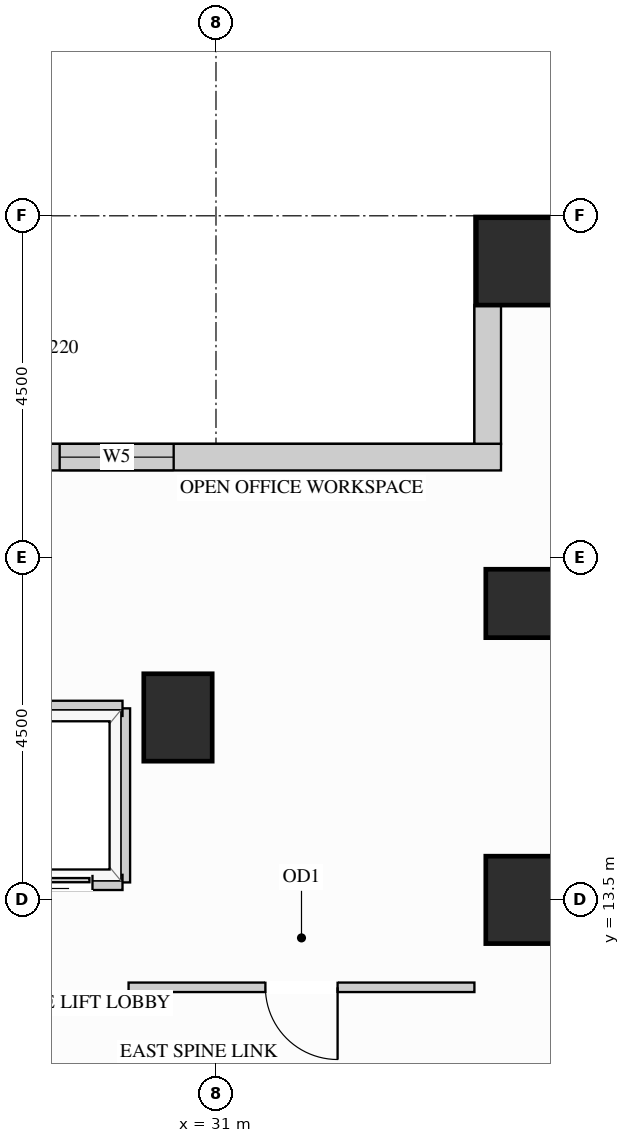
"""IFC4 building model, lengths in metres.
Left out: names, types, materials, properties, quantities, classifications, styles, units other than length and angle.
Written with IfcOpenShell. Run it as: python <this file> out.ifc"""

import sys

from ifc_helpers import new_model, si_unit, direction, frame, frame_2d, origin, origin_2d, place, context, subcontext, project, spatial, rectangle, extrude, source, transform, mapped, element, fill, save


model = new_model("IFC4")
c1 = context("Model", 3, precision=1e-05, world=origin(), true_north=direction((0.0, 1.0)))
c2 = subcontext(c1, "Body", "Model", "MODEL_VIEW")
j1 = project(units=[si_unit("LENGTHUNIT", "METRE"), si_unit("PLANEANGLEUNIT", "RADIAN")], contexts=[c1])
p1 = place(None, origin())
s1 = spatial("IfcSite", under=j1, at=p1, CompositionType="ELEMENT")
p2 = place(p1, origin())
s2 = spatial("IfcBuilding", under=s1, at=p2, CompositionType="ELEMENT")
p3 = place(p2, frame((0.0, 0.0, 106.2)))
s3 = spatial("IfcBuildingStorey", under=s2, at=p3, CompositionType="ELEMENT", Elevation=106.2)
m1 = source(origin(), c2, "Body", "SweptSolid", [
    extrude(rectangle(XDim=0.9, YDim=0.9, at=origin_2d()), origin(), (0.0, 0.0, 1.0), 3.38),
])
p4 = place(p3, frame((35.0, 17.4, 0.0), z_axis=(0.0, 0.0, 1.0), x_axis=(1.0, 0.0, 0.0)))
e1 = element("IfcColumn", 1, at=p4, inside=s3, PredefinedType="COLUMN", context=c2, shape_type="MappedRepresentation", body=[
    mapped(m1, transform((0.0, 0.0, 0.0), x_axis=(1.0, 0.0, 0.0), y_axis=(0.0, 1.0, 0.0), z_axis=(0.0, 0.0, 1.0))),
])
m2 = source(origin(), c2, "Body", "SweptSolid", [
    extrude(rectangle(XDim=0.9, YDim=1.15, at=origin_2d()), origin(), (0.0, 0.0, 1.0), 3.38),
])
for number, where, z_axis, x_axis in (
    (2, (35.0, 13.5, 0.0), (0.0, 0.0, 1.0), (1.0, 0.0, 0.0)),
    (3, (30.5, 15.9, 0.0), (0.0, 0.0, 1.0), (1.0, 0.0, 0.0)),
):
    element("IfcColumn", number, at=place(p3, frame(where, z_axis=z_axis, x_axis=x_axis)), inside=s3, PredefinedType="COLUMN", context=c2, shape_type="MappedRepresentation", body=[
        mapped(m2, transform((0.0, 0.0, 0.0), x_axis=(1.0, 0.0, 0.0), y_axis=(0.0, 1.0, 0.0), z_axis=(0.0, 0.0, 1.0))),
    ])
m3 = source(origin(), c2, "Body", "SweptSolid", [
    extrude(rectangle(XDim=1.15, YDim=1.15, at=origin_2d()), origin(), (0.0, 0.0, 1.0), 3.38),
])
p5 = place(p3, frame((35.0, 21.9, 0.0), z_axis=(0.0, 0.0, 1.0), x_axis=(1.0, 0.0, 0.0)))
e4 = element("IfcColumn", 4, at=p5, inside=s3, PredefinedType="COLUMN", context=c2, shape_type="MappedRepresentation", body=[
    mapped(m3, transform((0.0, 0.0, 0.0), x_axis=(1.0, 0.0, 0.0), y_axis=(0.0, 1.0, 0.0), z_axis=(0.0, 0.0, 1.0))),
])
m4 = source(origin(), c2, "Body", "SweptSolid", [
    extrude(rectangle(XDim=1.829, YDim=0.35, at=frame_2d((0.915, 0.0))), origin(), (0.0, 0.0, 1.0), 3.365),
])
p6 = place(p3, frame((34.575, 21.327, 0.0), z_axis=(0.0, 0.0, 1.0), x_axis=(0.0, -1.0, 0.0)))
e5 = element("IfcWall", 5, at=p6, inside=s3, PredefinedType="SOLIDWALL", context=c2, shape_type="MappedRepresentation", body=[
    mapped(m4, transform((0.0, 0.0, 0.0), x_axis=(1.0, 0.0, 0.0), y_axis=(0.0, 1.0, 0.0), z_axis=(0.0, 0.0, 1.0))),
])
p7 = place(p3, frame((34.75, 19.325, 0.0), z_axis=(0.0, 0.0, 1.0), x_axis=(-1.0, 0.0, 0.0)))
e6 = element("IfcWall", 6, at=p7, inside=s3, PredefinedType="SOLIDWALL", context=c2, shape_type="SweptSolid", body=[
    extrude(rectangle(XDim=15.6, YDim=0.35, at=frame_2d((7.8, 0.0))), origin(), (0.0, 0.0, 1.0), 3.365),
])
p8 = place(p7, frame((4.307, 0.0, 0.78)))
e7 = element("IfcOpeningElement", 7, at=p8, cuts=e6, PredefinedType="OPENING", context=c2, shape_type="SweptSolid", body=[
    extrude(rectangle(XDim=1.5, YDim=2.0, at=frame_2d((0.75, 1.0))), frame((0.0, 0.185, 0.0), z_axis=(0.0, -1.0, 0.0), x_axis=(1.0, 0.0, 0.0)), (0.0, 0.0, 1.0), 0.37),
])
p9 = place(p7, frame((9.793, 0.0, 0.78)))
e8 = element("IfcOpeningElement", 8, at=p9, cuts=e6, PredefinedType="OPENING", context=c2, shape_type="SweptSolid", body=[
    extrude(rectangle(XDim=1.5, YDim=2.0, at=frame_2d((0.75, 1.0))), frame((0.0, 0.185, 0.0), z_axis=(0.0, -1.0, 0.0), x_axis=(1.0, 0.0, 0.0)), (0.0, 0.0, 1.0), 0.37),
])
p10 = place(p3, frame((29.85, 12.35, 0.0), z_axis=(0.0, 0.0, 1.0), x_axis=(1.0, 0.0, 0.0)))
e9 = element("IfcWall", 9, at=p10, inside=s3, PredefinedType="PARTITIONING", context=c2, shape_type="SweptSolid", body=[
    extrude(rectangle(XDim=4.55, YDim=0.125, at=frame_2d((2.275, 0.0))), origin(), (0.0, 0.0, 1.0), 3.365),
])
p11 = place(p10, frame((1.8, 0.0, 0.0)))
e10 = element("IfcOpeningElement", 10, at=p11, cuts=e9, PredefinedType="OPENING", context=c2, shape_type="SweptSolid", body=[
    extrude(rectangle(XDim=0.95, YDim=2.15, at=frame_2d((0.475, 1.075))), frame((0.0, 0.073, 0.0), z_axis=(0.0, -1.0, 0.0), x_axis=(1.0, 0.0, 0.0)), (0.0, 0.0, 1.0), 0.145),
])
m5 = source(origin(), c2, "Body", "SweptSolid", [
    extrude(rectangle(XDim=2.29, YDim=0.2, at=frame_2d((1.145, 0.0))), origin(), (0.0, 0.0, 1.0), 3.365),
])
p12 = place(p3, frame((29.77, 13.73, 0.0), z_axis=(0.0, 0.0, 1.0), x_axis=(0.0, 1.0, 0.0)))
e11 = element("IfcWall", 11, at=p12, inside=s3, PredefinedType="PARTITIONING", context=c2, shape_type="MappedRepresentation", body=[
    mapped(m5, transform((0.0, 0.0, 0.0), x_axis=(1.0, 0.0, 0.0), y_axis=(0.0, 1.0, 0.0), z_axis=(0.0, 0.0, 1.0))),
])
m6 = source(origin(), c2, "Body", "SweptSolid", [
    extrude(rectangle(XDim=1.89, YDim=0.2, at=frame_2d((0.945, 0.0))), origin(), (0.0, 0.0, 1.0), 2.677),
])
p13 = place(p3, frame((27.88, 16.02, 0.0), z_axis=(0.0, 0.0, 1.0), x_axis=(1.0, 0.0, 0.0)))
e12 = element("IfcWall", 12, at=p13, inside=s3, PredefinedType="PARTITIONING", context=c2, shape_type="MappedRepresentation", body=[
    mapped(m6, transform((0.0, 0.0, 0.0), x_axis=(1.0, 0.0, 0.0), y_axis=(0.0, 1.0, 0.0), z_axis=(0.0, 0.0, 1.0))),
])
p14 = place(p3, frame((27.88, 13.73, 0.0), z_axis=(0.0, 0.0, 1.0), x_axis=(1.0, 0.0, 0.0)))
e13 = element("IfcWall", 13, at=p14, inside=s3, PredefinedType="PARTITIONING", context=c2, shape_type="SweptSolid", body=[
    extrude(rectangle(XDim=1.89, YDim=0.2, at=frame_2d((0.945, 0.0))), origin(), (0.0, 0.0, 1.0), 2.446),
])
p15 = place(p14, frame((0.395, 0.0, 0.0)))
e14 = element("IfcOpeningElement", 14, at=p15, cuts=e13, PredefinedType="OPENING", context=c2, shape_type="SweptSolid", body=[
    extrude(rectangle(XDim=1.1, YDim=2.2, at=frame_2d((0.55, 1.1))), frame((0.0, 0.11, 0.0), z_axis=(0.0, -1.0, 0.0), x_axis=(1.0, 0.0, 0.0)), (0.0, 0.0, 1.0), 0.22),
])
m7 = source(origin(), c2, "Body", "SweptSolid", [
    extrude(rectangle(XDim=1.1, YDim=2.2, at=frame_2d((0.55, 1.1))), frame((0.0, 0.025, 0.0), z_axis=(0.0, -1.0, 0.0), x_axis=(1.0, 0.0, 0.0)), (0.0, 0.0, 1.0), 0.05),
])
p16 = place(p15, origin())
e15 = element("IfcDoor", 15, at=p16, inside=s3, OperationType="SLIDING_TO_LEFT", PredefinedType="DOOR", context=c2, shape_type="MappedRepresentation", body=[
    mapped(m7, transform((0.0, 0.0, 0.0), x_axis=(1.0, 0.0, 0.0), y_axis=(0.0, 1.0, 0.0), z_axis=(0.0, 0.0, 1.0))),
])
fill(e14, e15)
m8 = source(origin(), c2, "Body", "SweptSolid", [
    extrude(rectangle(XDim=0.95, YDim=2.15, at=frame_2d((0.475, 1.075))), frame((0.0, 0.025, 0.0), z_axis=(0.0, -1.0, 0.0), x_axis=(1.0, 0.0, 0.0)), (0.0, 0.0, 1.0), 0.05),
])
p17 = place(p11, origin())
e16 = element("IfcDoor", 16, at=p17, inside=s3, OperationType="SINGLE_SWING_RIGHT", PredefinedType="DOOR", context=c2, shape_type="MappedRepresentation", body=[
    mapped(m8, transform((0.0, 0.0, 0.0), x_axis=(1.0, 0.0, 0.0), y_axis=(0.0, 1.0, 0.0), z_axis=(0.0, 0.0, 1.0))),
])
fill(e10, e16)
m9 = source(origin(), c2, "Body", "SweptSolid", [
    extrude(rectangle(XDim=1.5, YDim=2.0, at=frame_2d((0.75, 1.0))), frame((0.0, 0.03, 0.0), z_axis=(0.0, -1.0, 0.0), x_axis=(1.0, 0.0, 0.0)), (0.0, 0.0, 1.0), 0.06),
])
p18 = place(p8, origin())
e17 = element("IfcWindow", 17, at=p18, inside=s3, PartitioningType="SINGLE_PANEL", PredefinedType="WINDOW", context=c2, shape_type="MappedRepresentation", body=[
    mapped(m9, transform((0.0, 0.0, 0.0), x_axis=(1.0, 0.0, 0.0), y_axis=(0.0, 1.0, 0.0), z_axis=(0.0, 0.0, 1.0))),
])
fill(e7, e17)
save(model, sys.argv[1])
